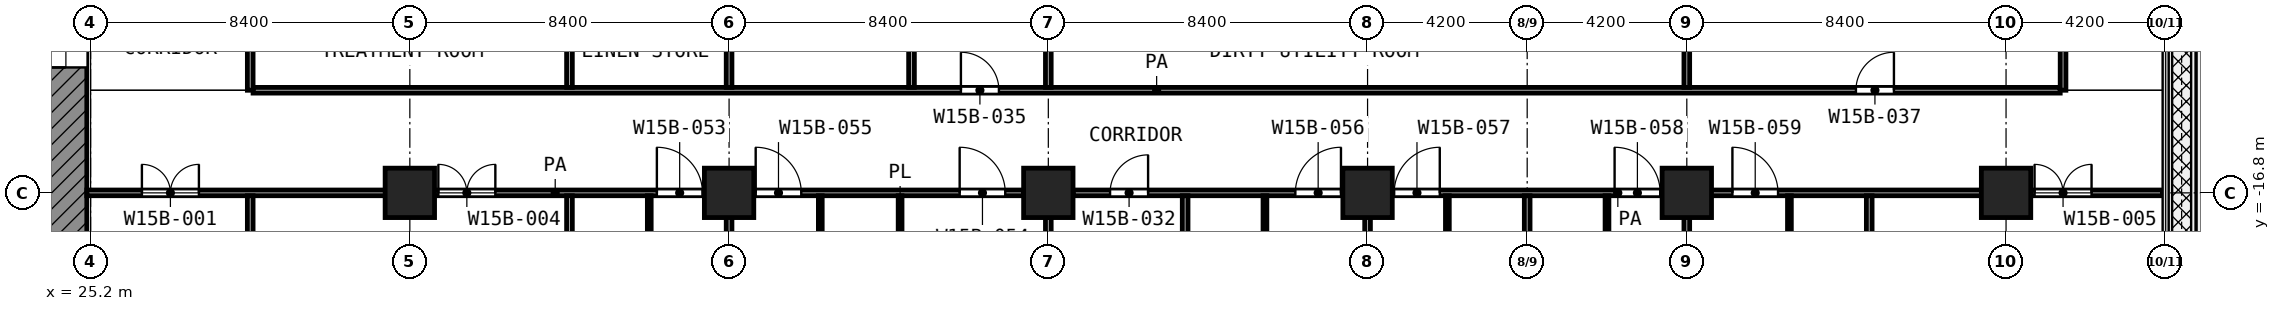
"""IFC4 building model, lengths in metres.
Left out: names, types, materials, properties, quantities, classifications, styles, units other than length and angle.
Written with IfcOpenShell. Run it as: python <this file> out.ifc"""

import sys

from ifc_helpers import new_model, si_unit, direction, frame, frame_2d, origin, origin_2d, place, context, subcontext, project, spatial, rectangle, extrude, element, fill, save


model = new_model("IFC4")
c1 = context("Model", 3, precision=1e-05, world=origin(), true_north=direction((0.0, 1.0)))
c2 = subcontext(c1, "Body", "Model", "MODEL_VIEW")
j1 = project(units=[si_unit("LENGTHUNIT", "METRE"), si_unit("PLANEANGLEUNIT", "RADIAN")], contexts=[c1])
p1 = place(None, origin())
s1 = spatial("IfcSite", under=j1, at=p1, CompositionType="ELEMENT")
p2 = place(p1, origin())
s2 = spatial("IfcBuilding", under=s1, at=p2, CompositionType="ELEMENT")
p3 = place(p2, frame((0.0, 0.0, 85.4)))
s3 = spatial("IfcBuildingStorey", under=s2, at=p3, CompositionType="ELEMENT", Elevation=85.4)
for number, where, z_axis, x_axis in (
    (1, (33.6, -16.8, 0.0), (0.0, 0.0, 1.0), (1.0, 0.0, 0.0)),
    (2, (42.0, -16.8, 0.0), (0.0, 0.0, 1.0), (1.0, 0.0, 0.0)),
    (3, (50.4, -16.8, 0.0), (0.0, 0.0, 1.0), (1.0, 0.0, 0.0)),
    (4, (58.8, -16.8, 0.0), (0.0, 0.0, 1.0), (1.0, 0.0, 0.0)),
    (5, (67.2, -16.8, 0.0), (0.0, 0.0, 1.0), (1.0, 0.0, 0.0)),
    (6, (75.6, -16.8, 0.0), (0.0, 0.0, 1.0), (1.0, 0.0, 0.0)),
):
    element("IfcColumn", number, at=place(p3, frame(where, z_axis=z_axis, x_axis=x_axis)), inside=s3, PredefinedType="COLUMN", context=c2, shape_type="SweptSolid", body=[
        extrude(rectangle(XDim=1.3, YDim=1.3, at=origin_2d()), origin(), (0.0, 0.0, 1.0), 4.2),
    ])
p4 = place(p3, frame((24.55, -24.0, 0.0), z_axis=(0.0, 0.0, 1.0), x_axis=(0.0, 1.0, 0.0)))
e7 = element("IfcWall", 7, at=p4, inside=s3, PredefinedType="SHEAR", context=c2, shape_type="SweptSolid", body=[
    extrude(rectangle(XDim=18.6, YDim=1.1, at=frame_2d((9.3, 0.0))), origin(), (0.0, 0.0, 1.0), 3.9),
])
p5 = place(p4, frame((10.5, 0.0, 0.0)))
e8 = element("IfcOpeningElement", 8, at=p5, cuts=e7, PredefinedType="OPENING", context=c2, shape_type="SweptSolid", body=[
    extrude(rectangle(XDim=1.8, YDim=2.1, at=frame_2d((0.9, 1.05))), frame((0.0, 0.56, 0.0), z_axis=(0.0, -1.0, 0.0), x_axis=(1.0, 0.0, 0.0)), (0.0, 0.0, 1.0), 1.12),
])
p6 = place(p3, frame((39.9, -19.5, 0.0), z_axis=(0.0, 0.0, 1.0), x_axis=(0.0, 1.0, 0.0)))
e9 = element("IfcWall", 9, at=p6, inside=s3, PredefinedType="PARTITIONING", context=c2, shape_type="SweptSolid", body=[
    extrude(rectangle(XDim=2.625, YDim=0.1, at=frame_2d((1.312, 0.0))), origin(), (0.0, 0.0, 1.0), 3.9),
])
p7 = place(p3, frame((44.4, -19.499, 0.0), z_axis=(0.0, 0.0, 1.0), x_axis=(0.0, 1.0, 0.0)))
e10 = element("IfcWall", 10, at=p7, inside=s3, PredefinedType="PARTITIONING", context=c2, shape_type="SweptSolid", body=[
    extrude(rectangle(XDim=2.624, YDim=0.1, at=frame_2d((1.312, 0.0))), origin(), (0.0, 0.0, 1.0), 3.9),
])
p8 = place(p3, frame((46.5, -19.498, 0.0), z_axis=(0.0, 0.0, 1.0), x_axis=(0.0, 1.0, 0.0)))
e11 = element("IfcWall", 11, at=p8, inside=s3, PredefinedType="PARTITIONING", context=c2, shape_type="SweptSolid", body=[
    extrude(rectangle(XDim=2.623, YDim=0.1, at=frame_2d((1.312, 0.0))), origin(), (0.0, 0.0, 1.0), 3.9),
])
for number, where, z_axis, x_axis in (
    (12, (56.1, -19.5, 0.0), (0.0, 0.0, 1.0), (0.0, 1.0, 0.0)),
    (13, (60.9, -19.5, 0.0), (0.0, 0.0, 1.0), (0.0, 1.0, 0.0)),
    (14, (65.1, -19.5, 0.0), (0.0, 0.0, 1.0), (0.0, 1.0, 0.0)),
    (15, (69.9, -19.5, 0.0), (0.0, 0.0, 1.0), (0.0, 1.0, 0.0)),
):
    element("IfcWall", number, at=place(p3, frame(where, z_axis=z_axis, x_axis=x_axis)), inside=s3, PredefinedType="PARTITIONING", context=c2, shape_type="SweptSolid", body=[
        extrude(rectangle(XDim=2.625, YDim=0.1, at=frame_2d((1.312, 0.0))), origin(), (0.0, 0.0, 1.0), 3.9),
    ])
p9 = place(p3, frame((25.1, -16.8, 0.0), z_axis=(0.0, 0.0, 1.0), x_axis=(1.0, 0.0, 0.0)))
e16 = element("IfcWall", 16, at=p9, inside=s3, PredefinedType="PARTITIONING", context=c2, shape_type="SweptSolid", body=[
    extrude(rectangle(XDim=24.65, YDim=0.15, at=frame_2d((12.325, 0.0))), origin(), (0.0, 0.0, 1.0), 3.9),
])
p10 = place(p9, frame((1.45, 0.0, 0.0)))
e17 = element("IfcOpeningElement", 17, at=p10, cuts=e16, PredefinedType="OPENING", context=c2, shape_type="SweptSolid", body=[
    extrude(rectangle(XDim=1.5, YDim=2.1, at=frame_2d((0.75, 1.05))), frame((0.0, 0.085, 0.0), z_axis=(0.0, -1.0, 0.0), x_axis=(1.0, 0.0, 0.0)), (0.0, 0.0, 1.0), 0.17),
])
p11 = place(p9, frame((9.25, 0.0, 0.0)))
e18 = element("IfcOpeningElement", 18, at=p11, cuts=e16, PredefinedType="OPENING", context=c2, shape_type="SweptSolid", body=[
    extrude(rectangle(XDim=1.5, YDim=2.1, at=frame_2d((0.75, 1.05))), frame((0.0, 0.085, 0.0), z_axis=(0.0, -1.0, 0.0), x_axis=(1.0, 0.0, 0.0)), (0.0, 0.0, 1.0), 0.17),
])
p12 = place(p9, frame((15.0, 0.0, 0.0)))
e19 = element("IfcOpeningElement", 19, at=p12, cuts=e16, PredefinedType="OPENING", context=c2, shape_type="SweptSolid", body=[
    extrude(rectangle(XDim=1.2, YDim=2.1, at=frame_2d((0.6, 1.05))), frame((0.0, 0.085, 0.0), z_axis=(0.0, -1.0, 0.0), x_axis=(1.0, 0.0, 0.0)), (0.0, 0.0, 1.0), 0.17),
])
p13 = place(p9, frame((22.967, 0.0, 0.0)))
e20 = element("IfcOpeningElement", 20, at=p13, cuts=e16, PredefinedType="OPENING", context=c2, shape_type="SweptSolid", body=[
    extrude(rectangle(XDim=1.2, YDim=2.1, at=frame_2d((0.6, 1.05))), frame((0.0, 0.085, 0.0), z_axis=(0.0, -1.0, 0.0), x_axis=(1.0, 0.0, 0.0)), (0.0, 0.0, 1.0), 0.17),
])
p14 = place(p9, frame((17.6, 0.0, 0.0)))
e21 = element("IfcOpeningElement", 21, at=p14, cuts=e16, PredefinedType="OPENING", context=c2, shape_type="SweptSolid", body=[
    extrude(rectangle(XDim=1.2, YDim=2.1, at=frame_2d((0.6, 1.05))), frame((0.0, 0.085, 0.0), z_axis=(0.0, -1.0, 0.0), x_axis=(1.0, 0.0, 0.0)), (0.0, 0.0, 1.0), 0.17),
])
p15 = place(p3, frame((51.05, -16.8, 0.0), z_axis=(0.0, 0.0, 1.0), x_axis=(1.0, 0.0, 0.0)))
e22 = element("IfcWall", 22, at=p15, inside=s3, PredefinedType="PARTITIONING", context=c2, shape_type="SweptSolid", body=[
    extrude(rectangle(XDim=28.67, YDim=0.15, at=frame_2d((14.335, 0.0))), origin(), (0.0, 0.0, 1.0), 3.9),
])
p16 = place(p15, frame((0.975, 0.0, 0.0)))
e23 = element("IfcOpeningElement", 23, at=p16, cuts=e22, PredefinedType="OPENING", context=c2, shape_type="SweptSolid", body=[
    extrude(rectangle(XDim=1.0, YDim=2.1, at=frame_2d((0.5, 1.05))), frame((0.0, 0.085, 0.0), z_axis=(0.0, -1.0, 0.0), x_axis=(1.0, 0.0, 0.0)), (0.0, 0.0, 1.0), 0.17),
])
p17 = place(p15, frame((5.85, 0.0, 0.0)))
e24 = element("IfcOpeningElement", 24, at=p17, cuts=e22, PredefinedType="OPENING", context=c2, shape_type="SweptSolid", body=[
    extrude(rectangle(XDim=1.2, YDim=2.1, at=frame_2d((0.6, 1.05))), frame((0.0, 0.085, 0.0), z_axis=(0.0, -1.0, 0.0), x_axis=(1.0, 0.0, 0.0)), (0.0, 0.0, 1.0), 0.17),
])
p18 = place(p15, frame((8.45, 0.0, 0.0)))
e25 = element("IfcOpeningElement", 25, at=p18, cuts=e22, PredefinedType="OPENING", context=c2, shape_type="SweptSolid", body=[
    extrude(rectangle(XDim=1.2, YDim=2.1, at=frame_2d((0.6, 1.05))), frame((0.0, 0.085, 0.0), z_axis=(0.0, -1.0, 0.0), x_axis=(1.0, 0.0, 0.0)), (0.0, 0.0, 1.0), 0.17),
])
p19 = place(p15, frame((14.25, 0.0, 0.0)))
e26 = element("IfcOpeningElement", 26, at=p19, cuts=e22, PredefinedType="OPENING", context=c2, shape_type="SweptSolid", body=[
    extrude(rectangle(XDim=1.2, YDim=2.1, at=frame_2d((0.6, 1.05))), frame((0.0, 0.085, 0.0), z_axis=(0.0, -1.0, 0.0), x_axis=(1.0, 0.0, 0.0)), (0.0, 0.0, 1.0), 0.17),
])
p20 = place(p15, frame((17.35, 0.0, 0.0)))
e27 = element("IfcOpeningElement", 27, at=p20, cuts=e22, PredefinedType="OPENING", context=c2, shape_type="SweptSolid", body=[
    extrude(rectangle(XDim=1.2, YDim=2.1, at=frame_2d((0.6, 1.05))), frame((0.0, 0.085, 0.0), z_axis=(0.0, -1.0, 0.0), x_axis=(1.0, 0.0, 0.0)), (0.0, 0.0, 1.0), 0.17),
])
p21 = place(p15, frame((25.3, 0.0, 0.0)))
e28 = element("IfcOpeningElement", 28, at=p21, cuts=e22, PredefinedType="OPENING", context=c2, shape_type="SweptSolid", body=[
    extrude(rectangle(XDim=1.5, YDim=2.1, at=frame_2d((0.75, 1.05))), frame((0.0, 0.085, 0.0), z_axis=(0.0, -1.0, 0.0), x_axis=(1.0, 0.0, 0.0)), (0.0, 0.0, 1.0), 0.17),
])
p22 = place(p3, frame((29.475, -14.1, 0.0), z_axis=(0.0, 0.0, 1.0), x_axis=(1.0, 0.0, 0.0)))
e29 = element("IfcWall", 29, at=p22, inside=s3, PredefinedType="PARTITIONING", context=c2, shape_type="SweptSolid", body=[
    extrude(rectangle(XDim=47.55, YDim=0.15, at=frame_2d((23.775, 0.0))), origin(), (0.0, 0.0, 1.0), 3.9),
])
p23 = place(p22, frame((18.625, 0.0, 0.0)))
e30 = element("IfcOpeningElement", 30, at=p23, cuts=e29, PredefinedType="OPENING", context=c2, shape_type="SweptSolid", body=[
    extrude(rectangle(XDim=1.0, YDim=2.1, at=frame_2d((0.5, 1.05))), frame((0.0, 0.085, 0.0), z_axis=(0.0, -1.0, 0.0), x_axis=(1.0, 0.0, 0.0)), (0.0, 0.0, 1.0), 0.17),
])
p24 = place(p22, frame((42.175, 0.0, 0.0)))
e31 = element("IfcOpeningElement", 31, at=p24, cuts=e29, PredefinedType="OPENING", context=c2, shape_type="SweptSolid", body=[
    extrude(rectangle(XDim=1.0, YDim=2.1, at=frame_2d((0.5, 1.05))), frame((0.0, 0.085, 0.0), z_axis=(0.0, -1.0, 0.0), x_axis=(1.0, 0.0, 0.0)), (0.0, 0.0, 1.0), 0.17),
])
p25 = place(p3, frame((29.4, -25.2, 0.0), z_axis=(0.0, 0.0, 1.0), x_axis=(0.0, 1.0, 0.0)))
e32 = element("IfcWall", 32, at=p25, inside=s3, PredefinedType="PARTITIONING", context=c2, shape_type="SweptSolid", body=[
    extrude(rectangle(XDim=8.325, YDim=0.15, at=frame_2d((4.163, 0.0))), origin(), (0.0, 0.0, 1.0), 3.9),
])
p26 = place(p3, frame((29.4, -14.1, 0.0), z_axis=(0.0, 0.0, 1.0), x_axis=(0.0, 1.0, 0.0)))
e33 = element("IfcWall", 33, at=p26, inside=s3, PredefinedType="PARTITIONING", context=c2, shape_type="SweptSolid", body=[
    extrude(rectangle(XDim=3.0, YDim=0.15, at=frame_2d((1.5, 0.0))), origin(), (0.0, 0.0, 1.0), 3.9),
])
p27 = place(p3, frame((37.8, -25.12, 0.0), z_axis=(0.0, 0.0, 1.0), x_axis=(0.0, 1.0, 0.0)))
e34 = element("IfcWall", 34, at=p27, inside=s3, PredefinedType="PARTITIONING", context=c2, shape_type="SweptSolid", body=[
    extrude(rectangle(XDim=8.245, YDim=0.15, at=frame_2d((4.123, 0.0))), origin(), (0.0, 0.0, 1.0), 3.9),
])
p28 = place(p3, frame((37.8, -14.025, 0.0), z_axis=(0.0, 0.0, 1.0), x_axis=(0.0, 1.0, 0.0)))
e35 = element("IfcWall", 35, at=p28, inside=s3, PredefinedType="PARTITIONING", context=c2, shape_type="SweptSolid", body=[
    extrude(rectangle(XDim=2.85, YDim=0.15, at=frame_2d((1.425, 0.0))), origin(), (0.0, 0.0, 1.0), 3.9),
])
p29 = place(p3, frame((42.0, -25.12, 0.0), z_axis=(0.0, 0.0, 1.0), x_axis=(0.0, 1.0, 0.0)))
e36 = element("IfcWall", 36, at=p29, inside=s3, PredefinedType="PARTITIONING", context=c2, shape_type="SweptSolid", body=[
    extrude(rectangle(XDim=8.245, YDim=0.15, at=frame_2d((4.123, 0.0))), origin(), (0.0, 0.0, 1.0), 3.9),
])
for number, where, z_axis, x_axis in (
    (37, (42.0, -14.025, 0.0), (0.0, 0.0, 1.0), (0.0, 1.0, 0.0)),
    (38, (46.8, -14.025, 0.0), (0.0, 0.0, 1.0), (0.0, 1.0, 0.0)),
):
    element("IfcWall", number, at=place(p3, frame(where, z_axis=z_axis, x_axis=x_axis)), inside=s3, PredefinedType="PARTITIONING", context=c2, shape_type="SweptSolid", body=[
        extrude(rectangle(XDim=2.85, YDim=0.15, at=frame_2d((1.425, 0.0))), origin(), (0.0, 0.0, 1.0), 3.9),
    ])
p30 = place(p3, frame((50.4, -24.6, 0.0), z_axis=(0.0, 0.0, 1.0), x_axis=(0.0, 1.0, 0.0)))
e39 = element("IfcWall", 39, at=p30, inside=s3, PredefinedType="PARTITIONING", context=c2, shape_type="SweptSolid", body=[
    extrude(rectangle(XDim=7.15, YDim=0.15, at=frame_2d((3.575, 0.0))), origin(), (0.0, 0.0, 1.0), 3.9),
])
p31 = place(p3, frame((50.4, -14.025, 0.0), z_axis=(0.0, 0.0, 1.0), x_axis=(0.0, 1.0, 0.0)))
e40 = element("IfcWall", 40, at=p31, inside=s3, PredefinedType="PARTITIONING", context=c2, shape_type="SweptSolid", body=[
    extrude(rectangle(XDim=2.85, YDim=0.15, at=frame_2d((1.425, 0.0))), origin(), (0.0, 0.0, 1.0), 3.9),
])
for number, where, z_axis, x_axis in (
    (41, (54.0, -25.12, 0.0), (0.0, 0.0, 1.0), (0.0, 1.0, 0.0)),
    (42, (58.8, -25.12, 0.0), (0.0, 0.0, 1.0), (0.0, 1.0, 0.0)),
    (43, (63.0, -25.12, 0.0), (0.0, 0.0, 1.0), (0.0, 1.0, 0.0)),
    (44, (67.2, -25.12, 0.0), (0.0, 0.0, 1.0), (0.0, 1.0, 0.0)),
):
    element("IfcWall", number, at=place(p3, frame(where, z_axis=z_axis, x_axis=x_axis)), inside=s3, PredefinedType="PARTITIONING", context=c2, shape_type="SweptSolid", body=[
        extrude(rectangle(XDim=8.245, YDim=0.15, at=frame_2d((4.123, 0.0))), origin(), (0.0, 0.0, 1.0), 3.9),
    ])
p32 = place(p3, frame((67.2, -14.025, 0.0), z_axis=(0.0, 0.0, 1.0), x_axis=(0.0, 1.0, 0.0)))
e45 = element("IfcWall", 45, at=p32, inside=s3, PredefinedType="PARTITIONING", context=c2, shape_type="SweptSolid", body=[
    extrude(rectangle(XDim=2.85, YDim=0.15, at=frame_2d((1.425, 0.0))), origin(), (0.0, 0.0, 1.0), 3.9),
])
p33 = place(p3, frame((72.0, -25.12, 0.0), z_axis=(0.0, 0.0, 1.0), x_axis=(0.0, 1.0, 0.0)))
e46 = element("IfcWall", 46, at=p33, inside=s3, PredefinedType="PARTITIONING", context=c2, shape_type="SweptSolid", body=[
    extrude(rectangle(XDim=8.245, YDim=0.15, at=frame_2d((4.123, 0.0))), origin(), (0.0, 0.0, 1.0), 3.9),
])
p34 = place(p3, frame((77.1, -14.1, 0.0), z_axis=(0.0, 0.0, 1.0), x_axis=(0.0, 1.0, 0.0)))
e47 = element("IfcWall", 47, at=p34, inside=s3, PredefinedType="PARTITIONING", context=c2, shape_type="SweptSolid", body=[
    extrude(rectangle(XDim=3.0, YDim=0.15, at=frame_2d((1.5, 0.0))), origin(), (0.0, 0.0, 1.0), 3.9),
])
p35 = place(p5, origin())
e48 = element("IfcDoor", 48, at=p35, inside=s3, OperationType="DOUBLE_DOOR_SINGLE_SWING", PredefinedType="DOOR", context=c2, shape_type="SweptSolid", body=[
    extrude(rectangle(XDim=1.8, YDim=2.1, at=frame_2d((0.9, 1.05))), frame((0.0, 0.025, 0.0), z_axis=(0.0, -1.0, 0.0), x_axis=(1.0, 0.0, 0.0)), (0.0, 0.0, 1.0), 0.05),
])
fill(e8, e48)
p36 = place(p10, origin())
e49 = element("IfcDoor", 49, at=p36, inside=s3, OperationType="DOUBLE_DOOR_SINGLE_SWING", PredefinedType="DOOR", context=c2, shape_type="SweptSolid", body=[
    extrude(rectangle(XDim=1.5, YDim=2.1, at=frame_2d((0.75, 1.05))), frame((0.0, 0.025, 0.0), z_axis=(0.0, -1.0, 0.0), x_axis=(1.0, 0.0, 0.0)), (0.0, 0.0, 1.0), 0.05),
])
fill(e17, e49)
p37 = place(p23, origin())
e50 = element("IfcDoor", 50, at=p37, inside=s3, OperationType="SINGLE_SWING_LEFT", PredefinedType="DOOR", context=c2, shape_type="SweptSolid", body=[
    extrude(rectangle(XDim=1.0, YDim=2.1, at=frame_2d((0.5, 1.05))), frame((0.0, 0.025, 0.0), z_axis=(0.0, -1.0, 0.0), x_axis=(1.0, 0.0, 0.0)), (0.0, 0.0, 1.0), 0.05),
])
fill(e30, e50)
p38 = place(p24, origin())
e51 = element("IfcDoor", 51, at=p38, inside=s3, OperationType="SINGLE_SWING_RIGHT", PredefinedType="DOOR", context=c2, shape_type="SweptSolid", body=[
    extrude(rectangle(XDim=1.0, YDim=2.1, at=frame_2d((0.5, 1.05))), frame((0.0, 0.025, 0.0), z_axis=(0.0, -1.0, 0.0), x_axis=(1.0, 0.0, 0.0)), (0.0, 0.0, 1.0), 0.05),
])
fill(e31, e51)
p39 = place(p11, origin())
e52 = element("IfcDoor", 52, at=p39, inside=s3, OperationType="DOUBLE_DOOR_SINGLE_SWING", PredefinedType="DOOR", context=c2, shape_type="SweptSolid", body=[
    extrude(rectangle(XDim=1.5, YDim=2.1, at=frame_2d((0.75, 1.05))), frame((0.0, 0.025, 0.0), z_axis=(0.0, -1.0, 0.0), x_axis=(1.0, 0.0, 0.0)), (0.0, 0.0, 1.0), 0.05),
])
fill(e18, e52)
p40 = place(p12, origin())
e53 = element("IfcDoor", 53, at=p40, inside=s3, OperationType="SINGLE_SWING_LEFT", PredefinedType="DOOR", context=c2, shape_type="SweptSolid", body=[
    extrude(rectangle(XDim=1.2, YDim=2.1, at=frame_2d((0.6, 1.05))), frame((0.0, 0.025, 0.0), z_axis=(0.0, -1.0, 0.0), x_axis=(1.0, 0.0, 0.0)), (0.0, 0.0, 1.0), 0.05),
])
fill(e19, e53)
p41 = place(p13, origin())
e54 = element("IfcDoor", 54, at=p41, inside=s3, OperationType="SINGLE_SWING_LEFT", PredefinedType="DOOR", context=c2, shape_type="SweptSolid", body=[
    extrude(rectangle(XDim=1.2, YDim=2.1, at=frame_2d((0.6, 1.05))), frame((0.0, 0.025, 0.0), z_axis=(0.0, -1.0, 0.0), x_axis=(1.0, 0.0, 0.0)), (0.0, 0.0, 1.0), 0.05),
])
fill(e20, e54)
p42 = place(p14, origin())
e55 = element("IfcDoor", 55, at=p42, inside=s3, OperationType="SINGLE_SWING_LEFT", PredefinedType="DOOR", context=c2, shape_type="SweptSolid", body=[
    extrude(rectangle(XDim=1.2, YDim=2.1, at=frame_2d((0.6, 1.05))), frame((0.0, 0.025, 0.0), z_axis=(0.0, -1.0, 0.0), x_axis=(1.0, 0.0, 0.0)), (0.0, 0.0, 1.0), 0.05),
])
fill(e21, e55)
p43 = place(p16, origin())
e56 = element("IfcDoor", 56, at=p43, inside=s3, OperationType="SINGLE_SWING_RIGHT", PredefinedType="DOOR", context=c2, shape_type="SweptSolid", body=[
    extrude(rectangle(XDim=1.0, YDim=2.1, at=frame_2d((0.5, 1.05))), frame((0.0, 0.025, 0.0), z_axis=(0.0, -1.0, 0.0), x_axis=(1.0, 0.0, 0.0)), (0.0, 0.0, 1.0), 0.05),
])
fill(e23, e56)
p44 = place(p17, origin())
e57 = element("IfcDoor", 57, at=p44, inside=s3, OperationType="SINGLE_SWING_RIGHT", PredefinedType="DOOR", context=c2, shape_type="SweptSolid", body=[
    extrude(rectangle(XDim=1.2, YDim=2.1, at=frame_2d((0.6, 1.05))), frame((0.0, 0.025, 0.0), z_axis=(0.0, -1.0, 0.0), x_axis=(1.0, 0.0, 0.0)), (0.0, 0.0, 1.0), 0.05),
])
fill(e24, e57)
p45 = place(p18, origin())
e58 = element("IfcDoor", 58, at=p45, inside=s3, OperationType="SINGLE_SWING_RIGHT", PredefinedType="DOOR", context=c2, shape_type="SweptSolid", body=[
    extrude(rectangle(XDim=1.2, YDim=2.1, at=frame_2d((0.6, 1.05))), frame((0.0, 0.025, 0.0), z_axis=(0.0, -1.0, 0.0), x_axis=(1.0, 0.0, 0.0)), (0.0, 0.0, 1.0), 0.05),
])
fill(e25, e58)
p46 = place(p19, origin())
e59 = element("IfcDoor", 59, at=p46, inside=s3, OperationType="SINGLE_SWING_LEFT", PredefinedType="DOOR", context=c2, shape_type="SweptSolid", body=[
    extrude(rectangle(XDim=1.2, YDim=2.1, at=frame_2d((0.6, 1.05))), frame((0.0, 0.025, 0.0), z_axis=(0.0, -1.0, 0.0), x_axis=(1.0, 0.0, 0.0)), (0.0, 0.0, 1.0), 0.05),
])
fill(e26, e59)
p47 = place(p20, origin())
e60 = element("IfcDoor", 60, at=p47, inside=s3, OperationType="SINGLE_SWING_LEFT", PredefinedType="DOOR", context=c2, shape_type="SweptSolid", body=[
    extrude(rectangle(XDim=1.2, YDim=2.1, at=frame_2d((0.6, 1.05))), frame((0.0, 0.025, 0.0), z_axis=(0.0, -1.0, 0.0), x_axis=(1.0, 0.0, 0.0)), (0.0, 0.0, 1.0), 0.05),
])
fill(e27, e60)
p48 = place(p21, origin())
e61 = element("IfcDoor", 61, at=p48, inside=s3, OperationType="DOUBLE_DOOR_SINGLE_SWING", PredefinedType="DOOR", context=c2, shape_type="SweptSolid", body=[
    extrude(rectangle(XDim=1.5, YDim=2.1, at=frame_2d((0.75, 1.05))), frame((0.0, 0.025, 0.0), z_axis=(0.0, -1.0, 0.0), x_axis=(1.0, 0.0, 0.0)), (0.0, 0.0, 1.0), 0.05),
])
fill(e28, e61)
save(model, sys.argv[1])
